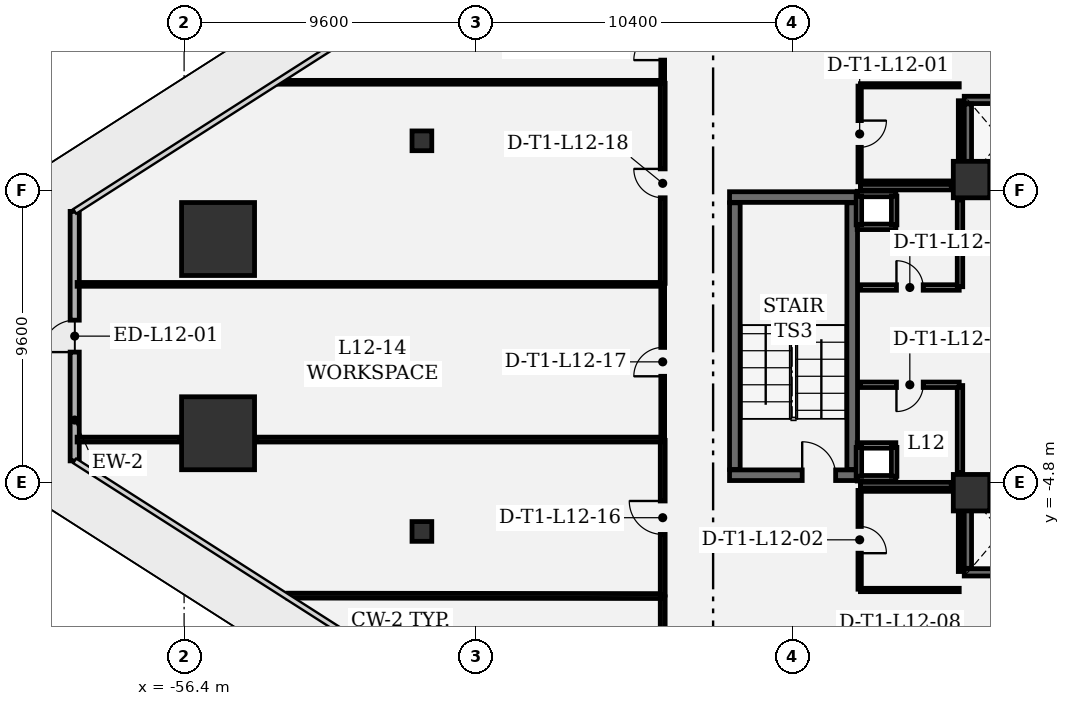
"""IFC4 building model, lengths in metres.
Left out: names, types, materials, properties, quantities, classifications, styles, units other than length and angle.
Written with IfcOpenShell. Run it as: python <this file> out.ifc"""

import sys

from ifc_helpers import new_model, si_unit, direction, frame, frame_2d, origin, origin_2d, place, context, subcontext, project, spatial, rectangle, extrude, element, fill, save


model = new_model("IFC4")
c1 = context("Model", 3, precision=1e-05, world=origin(), true_north=direction((0.0, 1.0)))
c2 = subcontext(c1, "Body", "Model", "MODEL_VIEW")
j1 = project(units=[si_unit("LENGTHUNIT", "METRE"), si_unit("PLANEANGLEUNIT", "RADIAN")], contexts=[c1])
p1 = place(None, origin())
s1 = spatial("IfcSite", under=j1, at=p1, CompositionType="ELEMENT")
p2 = place(p1, origin())
s2 = spatial("IfcBuilding", under=s1, at=p2, CompositionType="ELEMENT")
p3 = place(p2, frame((0.0, 0.0, 57.6)))
s3 = spatial("IfcBuildingStorey", under=s2, at=p3, CompositionType="ELEMENT", Elevation=57.6)
for number, where, z_axis, x_axis in (
    (1, (-55.283, 3.195, 0.0), (0.0, 0.0, 1.0), (1.0, 0.0, 0.0)),
    (2, (-55.283, -3.195, 0.0), (0.0, 0.0, 1.0), (1.0, 0.0, 0.0)),
):
    element("IfcColumn", number, at=place(p3, frame(where, z_axis=z_axis, x_axis=x_axis)), inside=s3, PredefinedType="COLUMN", context=c2, shape_type="SweptSolid", body=[
        extrude(rectangle(XDim=2.4, YDim=2.4, at=origin_2d()), origin(), (0.0, 0.0, 1.0), 4.2),
    ])
for number, where, z_axis, x_axis in (
    (3, (-30.5, 5.15, 0.0), (0.0, 0.0, 1.0), (1.0, 0.0, 0.0)),
    (4, (-30.5, -5.15, 0.0), (0.0, 0.0, 1.0), (1.0, 0.0, 0.0)),
):
    element("IfcColumn", number, at=place(p3, frame(where, z_axis=z_axis, x_axis=x_axis)), inside=s3, PredefinedType="COLUMN", context=c2, shape_type="SweptSolid", body=[
        extrude(rectangle(XDim=1.2, YDim=1.2, at=origin_2d()), origin(), (0.0, 0.0, 1.0), 4.2),
    ])
for number, where, z_axis, x_axis in (
    (5, (-48.578, 6.425, 0.0), (0.0, 0.0, 1.0), (1.0, 0.0, 0.0)),
    (6, (-48.578, -6.425, 0.0), (0.0, 0.0, 1.0), (1.0, 0.0, 0.0)),
):
    element("IfcColumn", number, at=place(p3, frame(where, z_axis=z_axis, x_axis=x_axis)), inside=s3, PredefinedType="COLUMN", context=c2, shape_type="SweptSolid", body=[
        extrude(rectangle(XDim=0.65, YDim=0.65, at=origin_2d()), origin(), (0.0, 0.0, 1.0), 4.2),
    ])
p4 = place(p3, frame((-59.998, -4.103, 0.0), z_axis=(0.0, 0.0, 1.0), x_axis=(0.0, 1.0, 0.0)))
e7 = element("IfcWall", 7, at=p4, inside=s3, PredefinedType="SOLIDWALL", context=c2, shape_type="SweptSolid", body=[
    extrude(rectangle(XDim=8.207, YDim=0.3, at=frame_2d((4.103, 0.0))), origin(), (0.0, 0.0, 1.0), 3.92),
])
p5 = place(p4, frame((3.578, 0.0, 0.0)))
e8 = element("IfcOpeningElement", 8, at=p5, cuts=e7, PredefinedType="OPENING", context=c2, shape_type="SweptSolid", body=[
    extrude(rectangle(XDim=1.05, YDim=2.2, at=frame_2d((0.525, 1.1))), frame((0.0, 0.16, 0.0), z_axis=(0.0, -1.0, 0.0), x_axis=(1.0, 0.0, 0.0)), (0.0, 0.0, 1.0), 0.32),
])
p6 = place(p3, frame((-38.46, -4.575, 0.0), z_axis=(0.0, 0.0, 1.0), x_axis=(1.0, 0.0, 0.0)))
e9 = element("IfcWall", 9, at=p6, inside=s3, PredefinedType="SHEAR", context=c2, shape_type="SweptSolid", body=[
    extrude(rectangle(XDim=4.21, YDim=0.35, at=frame_2d((2.105, 0.0))), origin(), (0.0, 0.0, 1.0), 3.92),
])
p7 = place(p6, frame((2.39, 0.0, 0.0)))
e10 = element("IfcOpeningElement", 10, at=p7, cuts=e9, PredefinedType="OPENING", context=c2, shape_type="SweptSolid", body=[
    extrude(rectangle(XDim=1.1, YDim=2.2, at=frame_2d((0.55, 1.1))), frame((0.0, 0.185, 0.0), z_axis=(0.0, -1.0, 0.0), x_axis=(1.0, 0.0, 0.0)), (0.0, 0.0, 1.0), 0.37),
])
p8 = place(p3, frame((-34.25, 4.575, 0.0), z_axis=(0.0, 0.0, 1.0), x_axis=(-1.0, 0.0, 0.0)))
e11 = element("IfcWall", 11, at=p8, inside=s3, PredefinedType="SHEAR", context=c2, shape_type="SweptSolid", body=[
    extrude(rectangle(XDim=4.21, YDim=0.35, at=frame_2d((2.105, 0.0))), origin(), (0.0, 0.0, 1.0), 3.92),
])
for number, where, z_axis, x_axis in (
    (12, (-34.425, -4.385, 0.0), (0.0, 0.0, 1.0), (0.0, 1.0, 0.0)),
    (13, (-38.285, 4.385, 0.0), (0.0, 0.0, 1.0), (0.0, -1.0, 0.0)),
):
    element("IfcWall", number, at=place(p3, frame(where, z_axis=z_axis, x_axis=x_axis)), inside=s3, PredefinedType="SHEAR", context=c2, shape_type="SweptSolid", body=[
        extrude(rectangle(XDim=8.77, YDim=0.35, at=frame_2d((4.385, 0.0))), origin(), (0.0, 0.0, 1.0), 3.92),
    ])
for number, where, z_axis, x_axis in (
    (14, (-28.26, 5.13, 0.0), (0.0, 0.0, 1.0), (-1.0, 0.0, 0.0)),
    (15, (-30.74, 7.77, 0.0), (0.0, 0.0, 1.0), (1.0, 0.0, 0.0)),
):
    element("IfcWall", number, at=place(p3, frame(where, z_axis=z_axis, x_axis=x_axis)), inside=s3, PredefinedType="SHEAR", context=c2, shape_type="SweptSolid", body=[
        extrude(rectangle(XDim=2.48, YDim=0.24, at=frame_2d((1.24, 0.0))), origin(), (0.0, 0.0, 1.0), 3.92),
    ])
p9 = place(p3, frame((-30.62, 5.262, 0.0), z_axis=(0.0, 0.0, 1.0), x_axis=(0.0, 1.0, 0.0)))
e16 = element("IfcWall", 16, at=p9, inside=s3, PredefinedType="SHEAR", context=c2, shape_type="SweptSolid", body=[
    extrude(rectangle(XDim=2.376, YDim=0.24, at=frame_2d((1.188, 0.0))), origin(), (0.0, 0.0, 1.0), 3.92),
])
for number, where, z_axis, x_axis in (
    (17, (-28.26, -7.77, 0.0), (0.0, 0.0, 1.0), (-1.0, 0.0, 0.0)),
    (18, (-30.74, -5.13, 0.0), (0.0, 0.0, 1.0), (1.0, 0.0, 0.0)),
):
    element("IfcWall", number, at=place(p3, frame(where, z_axis=z_axis, x_axis=x_axis)), inside=s3, PredefinedType="SHEAR", context=c2, shape_type="SweptSolid", body=[
        extrude(rectangle(XDim=2.48, YDim=0.24, at=frame_2d((1.24, 0.0))), origin(), (0.0, 0.0, 1.0), 3.92),
    ])
p10 = place(p3, frame((-30.62, -7.638, 0.0), z_axis=(0.0, 0.0, 1.0), x_axis=(0.0, 1.0, 0.0)))
e19 = element("IfcWall", 19, at=p10, inside=s3, PredefinedType="SHEAR", context=c2, shape_type="SweptSolid", body=[
    extrude(rectangle(XDim=2.376, YDim=0.24, at=frame_2d((1.188, 0.0))), origin(), (0.0, 0.0, 1.0), 3.92),
])
for number, where, z_axis, x_axis in (
    (20, (-32.99, 3.595, 0.0), (0.0, 0.0, 1.0), (-1.0, 0.0, 0.0)),
    (21, (-34.26, 4.675, 0.0), (0.0, 0.0, 1.0), (1.0, 0.0, 0.0)),
):
    element("IfcWall", number, at=place(p3, frame(where, z_axis=z_axis, x_axis=x_axis)), inside=s3, PredefinedType="PARTITIONING", context=c2, shape_type="SweptSolid", body=[
        extrude(rectangle(XDim=1.27, YDim=0.18, at=frame_2d((0.635, 0.0))), origin(), (0.0, 0.0, 1.0), 3.92),
    ])
for number, where, z_axis, x_axis in (
    (22, (-34.205, 3.66, 0.0), (0.0, 0.0, 1.0), (0.0, 1.0, 0.0)),
    (23, (-33.045, 4.61, 0.0), (0.0, 0.0, 1.0), (0.0, -1.0, 0.0)),
):
    element("IfcWall", number, at=place(p3, frame(where, z_axis=z_axis, x_axis=x_axis)), inside=s3, PredefinedType="PARTITIONING", context=c2, shape_type="SweptSolid", body=[
        extrude(rectangle(XDim=0.95, YDim=0.18, at=frame_2d((0.475, 0.0))), origin(), (0.0, 0.0, 1.0), 3.92),
    ])
for number, where, z_axis, x_axis in (
    (24, (-32.99, -4.675, 0.0), (0.0, 0.0, 1.0), (-1.0, 0.0, 0.0)),
    (25, (-34.26, -3.595, 0.0), (0.0, 0.0, 1.0), (1.0, 0.0, 0.0)),
):
    element("IfcWall", number, at=place(p3, frame(where, z_axis=z_axis, x_axis=x_axis)), inside=s3, PredefinedType="PARTITIONING", context=c2, shape_type="SweptSolid", body=[
        extrude(rectangle(XDim=1.27, YDim=0.18, at=frame_2d((0.635, 0.0))), origin(), (0.0, 0.0, 1.0), 3.92),
    ])
for number, where, z_axis, x_axis in (
    (26, (-34.205, -4.61, 0.0), (0.0, 0.0, 1.0), (0.0, 1.0, 0.0)),
    (27, (-33.045, -3.66, 0.0), (0.0, 0.0, 1.0), (0.0, -1.0, 0.0)),
):
    element("IfcWall", number, at=place(p3, frame(where, z_axis=z_axis, x_axis=x_axis)), inside=s3, PredefinedType="PARTITIONING", context=c2, shape_type="SweptSolid", body=[
        extrude(rectangle(XDim=0.95, YDim=0.18, at=frame_2d((0.475, 0.0))), origin(), (0.0, 0.0, 1.0), 3.92),
    ])
p11 = place(p3, frame((-34.18, 8.225, 0.0), z_axis=(0.0, 0.0, 1.0), x_axis=(0.0, -1.0, 0.0)))
e28 = element("IfcWall", 28, at=p11, inside=s3, PredefinedType="PARTITIONING", context=c2, shape_type="SweptSolid", body=[
    extrude(rectangle(XDim=3.15, YDim=0.11, at=frame_2d((1.575, 0.0))), origin(), (0.0, 0.0, 1.0), 3.92),
])
p12 = place(p11, frame((1.135, 0.0, 0.0)))
e29 = element("IfcOpeningElement", 29, at=p12, cuts=e28, PredefinedType="OPENING", context=c2, shape_type="SweptSolid", body=[
    extrude(rectangle(XDim=0.88, YDim=2.1, at=frame_2d((0.44, 1.05))), frame((0.0, 0.065, 0.0), z_axis=(0.0, -1.0, 0.0), x_axis=(1.0, 0.0, 0.0)), (0.0, 0.0, 1.0), 0.13),
])
p13 = place(p3, frame((-34.155, 5.05, 0.0), z_axis=(0.0, 0.0, 1.0), x_axis=(1.0, 0.0, 0.0)))
e30 = element("IfcWall", 30, at=p13, inside=s3, PredefinedType="PARTITIONING", context=c2, shape_type="SweptSolid", body=[
    extrude(rectangle(XDim=2.99, YDim=0.11, at=frame_2d((1.495, 0.0))), origin(), (0.0, 0.0, 1.0), 3.92),
])
p14 = place(p3, frame((-30.88, 5.815, 0.0), z_axis=(0.0, 0.0, 1.0), x_axis=(0.0, 1.0, 0.0)))
e31 = element("IfcWall", 31, at=p14, inside=s3, PredefinedType="PARTITIONING", context=c2, shape_type="SweptSolid", body=[
    extrude(rectangle(XDim=1.928, YDim=0.11, at=frame_2d((0.964, 0.0))), origin(), (0.0, 0.0, 1.0), 3.92),
])
for number, where, z_axis, x_axis in (
    (32, (-30.905, 8.25, 0.0), (0.0, 0.0, 1.0), (-1.0, 0.0, 0.0)),
    (33, (-34.155, -8.35, 0.0), (0.0, 0.0, 1.0), (1.0, 0.0, 0.0)),
):
    element("IfcWall", number, at=place(p3, frame(where, z_axis=z_axis, x_axis=x_axis)), inside=s3, PredefinedType="PARTITIONING", context=c2, shape_type="SweptSolid", body=[
        extrude(rectangle(XDim=3.25, YDim=0.11, at=frame_2d((1.625, 0.0))), origin(), (0.0, 0.0, 1.0), 3.92),
    ])
p15 = place(p3, frame((-30.88, -7.743, 0.0), z_axis=(0.0, 0.0, 1.0), x_axis=(0.0, 1.0, 0.0)))
e34 = element("IfcWall", 34, at=p15, inside=s3, PredefinedType="PARTITIONING", context=c2, shape_type="SweptSolid", body=[
    extrude(rectangle(XDim=1.928, YDim=0.11, at=frame_2d((0.964, 0.0))), origin(), (0.0, 0.0, 1.0), 3.92),
])
p16 = place(p3, frame((-31.165, -5.05, 0.0), z_axis=(0.0, 0.0, 1.0), x_axis=(-1.0, 0.0, 0.0)))
e35 = element("IfcWall", 35, at=p16, inside=s3, PredefinedType="PARTITIONING", context=c2, shape_type="SweptSolid", body=[
    extrude(rectangle(XDim=2.99, YDim=0.11, at=frame_2d((1.495, 0.0))), origin(), (0.0, 0.0, 1.0), 3.92),
])
p17 = place(p3, frame((-34.18, -5.075, 0.0), z_axis=(0.0, 0.0, 1.0), x_axis=(0.0, -1.0, 0.0)))
e36 = element("IfcWall", 36, at=p17, inside=s3, PredefinedType="PARTITIONING", context=c2, shape_type="SweptSolid", body=[
    extrude(rectangle(XDim=3.25, YDim=0.11, at=frame_2d((1.625, 0.0))), origin(), (0.0, 0.0, 1.0), 3.92),
])
p18 = place(p17, frame((1.185, 0.0, 0.0)))
e37 = element("IfcOpeningElement", 37, at=p18, cuts=e36, PredefinedType="OPENING", context=c2, shape_type="SweptSolid", body=[
    extrude(rectangle(XDim=0.88, YDim=2.1, at=frame_2d((0.44, 1.05))), frame((0.0, 0.065, 0.0), z_axis=(0.0, -1.0, 0.0), x_axis=(1.0, 0.0, 0.0)), (0.0, 0.0, 1.0), 0.13),
])
p19 = place(p3, frame((-34.155, 1.6, 0.0), z_axis=(0.0, 0.0, 1.0), x_axis=(1.0, 0.0, 0.0)))
e38 = element("IfcWall", 38, at=p19, inside=s3, PredefinedType="PARTITIONING", context=c2, shape_type="SweptSolid", body=[
    extrude(rectangle(XDim=3.25, YDim=0.18, at=frame_2d((1.625, 0.0))), origin(), (0.0, 0.0, 1.0), 3.92),
])
p20 = place(p19, frame((1.185, 0.0, 0.0)))
e39 = element("IfcOpeningElement", 39, at=p20, cuts=e38, PredefinedType="OPENING", context=c2, shape_type="SweptSolid", body=[
    extrude(rectangle(XDim=0.88, YDim=2.1, at=frame_2d((0.44, 1.05))), frame((0.0, 0.1, 0.0), z_axis=(0.0, -1.0, 0.0), x_axis=(1.0, 0.0, 0.0)), (0.0, 0.0, 1.0), 0.2),
])
p21 = place(p3, frame((-30.88, 1.625, 0.0), z_axis=(0.0, 0.0, 1.0), x_axis=(0.0, 1.0, 0.0)))
e40 = element("IfcWall", 40, at=p21, inside=s3, PredefinedType="PARTITIONING", context=c2, shape_type="SweptSolid", body=[
    extrude(rectangle(XDim=2.86, YDim=0.18, at=frame_2d((1.43, 0.0))), origin(), (0.0, 0.0, 1.0), 3.92),
])
for number, where, z_axis, x_axis in (
    (41, (-31.165, 4.9, 0.0), (0.0, 0.0, 1.0), (-1.0, 0.0, 0.0)),
    (42, (-34.155, -4.9, 0.0), (0.0, 0.0, 1.0), (1.0, 0.0, 0.0)),
):
    element("IfcWall", number, at=place(p3, frame(where, z_axis=z_axis, x_axis=x_axis)), inside=s3, PredefinedType="PARTITIONING", context=c2, shape_type="SweptSolid", body=[
        extrude(rectangle(XDim=2.99, YDim=0.18, at=frame_2d((1.495, 0.0))), origin(), (0.0, 0.0, 1.0), 3.92),
    ])
p22 = place(p3, frame((-30.88, -4.485, 0.0), z_axis=(0.0, 0.0, 1.0), x_axis=(0.0, 1.0, 0.0)))
e43 = element("IfcWall", 43, at=p22, inside=s3, PredefinedType="PARTITIONING", context=c2, shape_type="SweptSolid", body=[
    extrude(rectangle(XDim=2.86, YDim=0.18, at=frame_2d((1.43, 0.0))), origin(), (0.0, 0.0, 1.0), 3.92),
])
p23 = place(p3, frame((-30.905, -1.6, 0.0), z_axis=(0.0, 0.0, 1.0), x_axis=(-1.0, 0.0, 0.0)))
e44 = element("IfcWall", 44, at=p23, inside=s3, PredefinedType="PARTITIONING", context=c2, shape_type="SweptSolid", body=[
    extrude(rectangle(XDim=3.25, YDim=0.18, at=frame_2d((1.625, 0.0))), origin(), (0.0, 0.0, 1.0), 3.92),
])
p24 = place(p23, frame((1.185, 0.0, 0.0)))
e45 = element("IfcOpeningElement", 45, at=p24, cuts=e44, PredefinedType="OPENING", context=c2, shape_type="SweptSolid", body=[
    extrude(rectangle(XDim=0.88, YDim=2.1, at=frame_2d((0.44, 1.05))), frame((0.0, 0.1, 0.0), z_axis=(0.0, -1.0, 0.0), x_axis=(1.0, 0.0, 0.0)), (0.0, 0.0, 1.0), 0.2),
])
p25 = place(p3, frame((-40.658, 8.375, 0.0), z_axis=(0.0, 0.0, 1.0), x_axis=(0.0, 1.0, 0.0)))
e46 = element("IfcWall", 46, at=p25, inside=s3, PredefinedType="PARTITIONING", context=c2, shape_type="SweptSolid", body=[
    extrude(rectangle(XDim=2.358, YDim=0.125, at=frame_2d((1.179, 0.0))), origin(), (0.0, 0.0, 1.0), 3.92),
])
p26 = place(p25, frame((0.704, 0.0, 0.0)))
e47 = element("IfcOpeningElement", 47, at=p26, cuts=e46, PredefinedType="OPENING", context=c2, shape_type="SweptSolid", body=[
    extrude(rectangle(XDim=0.95, YDim=2.15, at=frame_2d((0.475, 1.075))), frame((0.0, 0.073, 0.0), z_axis=(0.0, -1.0, 0.0), x_axis=(1.0, 0.0, 0.0)), (0.0, 0.0, 1.0), 0.145),
])
p27 = place(p3, frame((-53.274, 8.35, 0.0), z_axis=(0.0, 0.0, 1.0), x_axis=(1.0, 0.0, 0.0)))
e48 = element("IfcWall", 48, at=p27, inside=s3, PredefinedType="PARTITIONING", context=c2, shape_type="SweptSolid", body=[
    extrude(rectangle(XDim=12.591, YDim=0.125, at=frame_2d((6.295, 0.0))), origin(), (0.0, 0.0, 1.0), 2.89),
])
p28 = place(p3, frame((-40.658, -8.575, 0.0), z_axis=(0.0, 0.0, 1.0), x_axis=(0.0, -1.0, 0.0)))
e49 = element("IfcWall", 49, at=p28, inside=s3, PredefinedType="PARTITIONING", context=c2, shape_type="SweptSolid", body=[
    extrude(rectangle(XDim=2.358, YDim=0.16, at=frame_2d((1.179, 0.0))), origin(), (0.0, 0.0, 1.0), 3.92),
])
p29 = place(p3, frame((-40.683, -8.55, 0.0), z_axis=(0.0, 0.0, 1.0), x_axis=(-0.999999290934, 0.001190853395, 0.0)))
e50 = element("IfcWall", 50, at=p29, inside=s3, PredefinedType="PARTITIONING", context=c2, shape_type="SweptSolid", body=[
    extrude(rectangle(XDim=12.301, YDim=0.16, at=frame_2d((6.15, 0.0))), origin(), (0.0, 0.0, 1.0), 2.89),
])
p30 = place(p3, frame((-40.658, -8.517, 0.0), z_axis=(0.0, 0.0, 1.0), x_axis=(0.0, 1.0, 0.0)))
e51 = element("IfcWall", 51, at=p30, inside=s3, PredefinedType="PARTITIONING", context=c2, shape_type="SweptSolid", body=[
    extrude(rectangle(XDim=5.089, YDim=0.16, at=frame_2d((2.545, 0.0))), origin(), (0.0, 0.0, 1.0), 3.92),
])
p31 = place(p30, frame((1.995, 0.0, 0.0)))
e52 = element("IfcOpeningElement", 52, at=p31, cuts=e51, PredefinedType="OPENING", context=c2, shape_type="SweptSolid", body=[
    extrude(rectangle(XDim=1.1, YDim=2.15, at=frame_2d((0.55, 1.075))), frame((0.0, 0.09, 0.0), z_axis=(0.0, -1.0, 0.0), x_axis=(1.0, 0.0, 0.0)), (0.0, 0.0, 1.0), 0.18),
])
p32 = place(p3, frame((-40.683, -3.403, 0.0), z_axis=(0.0, 0.0, 1.0), x_axis=(-1.0, 0.0, 0.0)))
e53 = element("IfcWall", 53, at=p32, inside=s3, PredefinedType="PARTITIONING", context=c2, shape_type="SweptSolid", body=[
    extrude(rectangle(XDim=13.335, YDim=0.16, at=frame_2d((6.667, 0.0))), origin(), (0.0, 0.0, 1.0), 2.89),
])
p33 = place(p3, frame((-56.548, -3.403, 0.0), z_axis=(0.0, 0.0, 1.0), x_axis=(-1.0, 0.0, 0.0)))
e54 = element("IfcWall", 54, at=p33, inside=s3, PredefinedType="PARTITIONING", context=c2, shape_type="SweptSolid", body=[
    extrude(rectangle(XDim=3.371, YDim=0.16, at=frame_2d((1.685, 0.0))), origin(), (0.0, 0.0, 1.0), 3.92),
])
p34 = place(p3, frame((-40.658, -3.37, 0.0), z_axis=(0.0, 0.0, 1.0), x_axis=(0.0, 1.0, 0.0)))
e55 = element("IfcWall", 55, at=p34, inside=s3, PredefinedType="PARTITIONING", context=c2, shape_type="SweptSolid", body=[
    extrude(rectangle(XDim=5.048, YDim=0.125, at=frame_2d((2.524, 0.0))), origin(), (0.0, 0.0, 1.0), 3.92),
])
p35 = place(p34, frame((2.049, 0.0, 0.0)))
e56 = element("IfcOpeningElement", 56, at=p35, cuts=e55, PredefinedType="OPENING", context=c2, shape_type="SweptSolid", body=[
    extrude(rectangle(XDim=0.95, YDim=2.15, at=frame_2d((0.475, 1.075))), frame((0.0, 0.073, 0.0), z_axis=(0.0, -1.0, 0.0), x_axis=(1.0, 0.0, 0.0)), (0.0, 0.0, 1.0), 0.145),
])
p36 = place(p3, frame((-40.683, 1.703, 0.0), z_axis=(0.0, 0.0, 1.0), x_axis=(-1.0, 0.0, 0.0)))
e57 = element("IfcWall", 57, at=p36, inside=s3, PredefinedType="PARTITIONING", context=c2, shape_type="SweptSolid", body=[
    extrude(rectangle(XDim=19.235, YDim=0.125, at=frame_2d((9.618, 0.0))), origin(), (0.0, 0.0, 1.0), 3.92),
])
p37 = place(p3, frame((-40.658, 1.736, 0.0), z_axis=(0.0, 0.0, 1.0), x_axis=(0.0, 1.0, 0.0)))
e58 = element("IfcWall", 58, at=p37, inside=s3, PredefinedType="PARTITIONING", context=c2, shape_type="SweptSolid", body=[
    extrude(rectangle(XDim=6.581, YDim=0.16, at=frame_2d((3.291, 0.0))), origin(), (0.0, 0.0, 1.0), 3.92),
])
p38 = place(p37, frame((2.815, 0.0, 0.0)))
e59 = element("IfcOpeningElement", 59, at=p38, cuts=e58, PredefinedType="OPENING", context=c2, shape_type="SweptSolid", body=[
    extrude(rectangle(XDim=0.95, YDim=2.15, at=frame_2d((0.475, 1.075))), frame((0.0, 0.09, 0.0), z_axis=(0.0, -1.0, 0.0), x_axis=(1.0, 0.0, 0.0)), (0.0, 0.0, 1.0), 0.18),
])
p39 = place(p5, origin())
e60 = element("IfcDoor", 60, at=p39, inside=s3, OperationType="SINGLE_SWING_LEFT", PredefinedType="DOOR", context=c2, shape_type="SweptSolid", body=[
    extrude(rectangle(XDim=1.05, YDim=2.2, at=frame_2d((0.525, 1.1))), frame((0.0, 0.025, 0.0), z_axis=(0.0, -1.0, 0.0), x_axis=(1.0, 0.0, 0.0)), (0.0, 0.0, 1.0), 0.05),
])
fill(e8, e60)
p40 = place(p7, origin())
e61 = element("IfcDoor", 61, at=p40, inside=s3, OperationType="SINGLE_SWING_LEFT", PredefinedType="DOOR", context=c2, shape_type="SweptSolid", body=[
    extrude(rectangle(XDim=1.1, YDim=2.2, at=frame_2d((0.55, 1.1))), frame((0.0, 0.025, 0.0), z_axis=(0.0, -1.0, 0.0), x_axis=(1.0, 0.0, 0.0)), (0.0, 0.0, 1.0), 0.05),
])
fill(e10, e61)
p41 = place(p12, origin())
e62 = element("IfcDoor", 62, at=p41, inside=s3, OperationType="SINGLE_SWING_LEFT", PredefinedType="DOOR", context=c2, shape_type="SweptSolid", body=[
    extrude(rectangle(XDim=0.88, YDim=2.1, at=frame_2d((0.44, 1.05))), frame((0.0, 0.025, 0.0), z_axis=(0.0, -1.0, 0.0), x_axis=(1.0, 0.0, 0.0)), (0.0, 0.0, 1.0), 0.05),
])
fill(e29, e62)
p42 = place(p18, origin())
e63 = element("IfcDoor", 63, at=p42, inside=s3, OperationType="SINGLE_SWING_RIGHT", PredefinedType="DOOR", context=c2, shape_type="SweptSolid", body=[
    extrude(rectangle(XDim=0.88, YDim=2.1, at=frame_2d((0.44, 1.05))), frame((0.0, 0.025, 0.0), z_axis=(0.0, -1.0, 0.0), x_axis=(1.0, 0.0, 0.0)), (0.0, 0.0, 1.0), 0.05),
])
fill(e37, e63)
p43 = place(p20, origin())
e64 = element("IfcDoor", 64, at=p43, inside=s3, OperationType="SINGLE_SWING_LEFT", PredefinedType="DOOR", context=c2, shape_type="SweptSolid", body=[
    extrude(rectangle(XDim=0.88, YDim=2.1, at=frame_2d((0.44, 1.05))), frame((0.0, 0.025, 0.0), z_axis=(0.0, -1.0, 0.0), x_axis=(1.0, 0.0, 0.0)), (0.0, 0.0, 1.0), 0.05),
])
fill(e39, e64)
p44 = place(p24, origin())
e65 = element("IfcDoor", 65, at=p44, inside=s3, OperationType="SINGLE_SWING_RIGHT", PredefinedType="DOOR", context=c2, shape_type="SweptSolid", body=[
    extrude(rectangle(XDim=0.88, YDim=2.1, at=frame_2d((0.44, 1.05))), frame((0.0, 0.025, 0.0), z_axis=(0.0, -1.0, 0.0), x_axis=(1.0, 0.0, 0.0)), (0.0, 0.0, 1.0), 0.05),
])
fill(e45, e65)
p45 = place(p31, origin())
e66 = element("IfcDoor", 66, at=p45, inside=s3, OperationType="SINGLE_SWING_RIGHT", PredefinedType="DOOR", context=c2, shape_type="SweptSolid", body=[
    extrude(rectangle(XDim=1.1, YDim=2.15, at=frame_2d((0.55, 1.075))), frame((0.0, 0.025, 0.0), z_axis=(0.0, -1.0, 0.0), x_axis=(1.0, 0.0, 0.0)), (0.0, 0.0, 1.0), 0.05),
])
fill(e52, e66)
p46 = place(p35, origin())
e67 = element("IfcDoor", 67, at=p46, inside=s3, OperationType="SINGLE_SWING_LEFT", PredefinedType="DOOR", context=c2, shape_type="SweptSolid", body=[
    extrude(rectangle(XDim=0.95, YDim=2.15, at=frame_2d((0.475, 1.075))), frame((0.0, 0.025, 0.0), z_axis=(0.0, -1.0, 0.0), x_axis=(1.0, 0.0, 0.0)), (0.0, 0.0, 1.0), 0.05),
])
fill(e56, e67)
p47 = place(p38, origin())
e68 = element("IfcDoor", 68, at=p47, inside=s3, OperationType="SINGLE_SWING_RIGHT", PredefinedType="DOOR", context=c2, shape_type="SweptSolid", body=[
    extrude(rectangle(XDim=0.95, YDim=2.15, at=frame_2d((0.475, 1.075))), frame((0.0, 0.025, 0.0), z_axis=(0.0, -1.0, 0.0), x_axis=(1.0, 0.0, 0.0)), (0.0, 0.0, 1.0), 0.05),
])
fill(e59, e68)
p48 = place(p26, origin())
e69 = element("IfcDoor", 69, at=p48, inside=s3, OperationType="SINGLE_SWING_LEFT", PredefinedType="DOOR", context=c2, shape_type="SweptSolid", body=[
    extrude(rectangle(XDim=0.95, YDim=2.15, at=frame_2d((0.475, 1.075))), frame((0.0, 0.025, 0.0), z_axis=(0.0, -1.0, 0.0), x_axis=(1.0, 0.0, 0.0)), (0.0, 0.0, 1.0), 0.05),
])
fill(e47, e69)
save(model, sys.argv[1])
